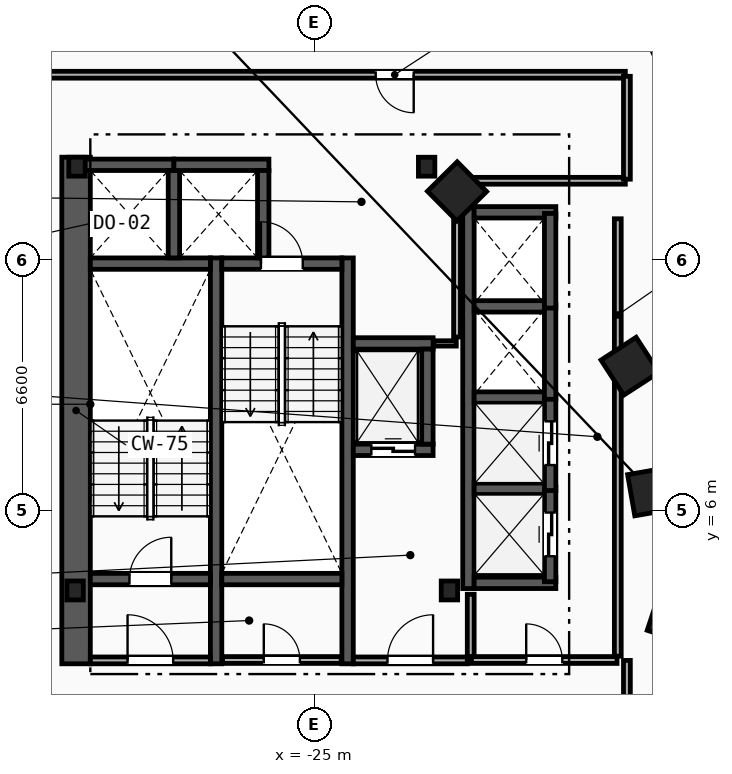
"""IFC4 building model, lengths in metres.
Left out: names, types, materials, properties, quantities, classifications, styles, units other than length and angle.
Written with IfcOpenShell. Run it as: python <this file> out.ifc"""

import sys

from ifc_helpers import new_model, si_unit, direction, frame, frame_2d, origin, origin_2d, place, context, subcontext, project, spatial, rectangle, i_section, extrude, element, fill, save


model = new_model("IFC4")
c1 = context("Model", 3, precision=1e-05, world=origin(), true_north=direction((0.0, 1.0)))
c2 = subcontext(c1, "Body", "Model", "MODEL_VIEW")
j1 = project(units=[si_unit("LENGTHUNIT", "METRE"), si_unit("PLANEANGLEUNIT", "RADIAN")], contexts=[c1])
p1 = place(None, origin())
s1 = spatial("IfcSite", under=j1, at=p1, CompositionType="ELEMENT")
p2 = place(p1, origin())
s2 = spatial("IfcBuilding", under=s1, at=p2, CompositionType="ELEMENT")
p3 = place(p2, frame((0.0, 0.0, 81.8)))
s3 = spatial("IfcBuildingStorey", under=s2, at=p3, CompositionType="ELEMENT", Elevation=81.8)
for number, where, z_axis, x_axis in (
    (1, (-31.3, 3.9, 0.0), (0.0, 0.0, 1.0), (1.0, 0.0, 0.0)),
    (2, (-21.45, 3.9, 0.0), (0.0, 0.0, 1.0), (1.0, 0.0, 0.0)),
    (3, (-22.05, 15.05, 0.0), (0.0, 0.0, 1.0), (1.0, 0.0, 0.0)),
    (4, (-31.25, 15.05, 0.0), (0.0, 0.0, 1.0), (1.0, 0.0, 0.0)),
):
    element("IfcColumn", number, at=place(p3, frame(where, z_axis=z_axis, x_axis=x_axis)), inside=s3, PredefinedType="COLUMN", context=c2, shape_type="SweptSolid", body=[
        extrude(i_section(OverallWidth=0.432, OverallDepth=0.498, WebThickness=0.056, FlangeThickness=0.089, FilletRadius=0.018, at=origin_2d()), origin(), (0.0, 0.0, 1.0), 3.6),
    ])
for number, where, z_axis, x_axis in (
    (5, (-15.55, 3.2, 0.0), (0.0, 0.0, 1.0), (0.315, 0.949, 0.0)),
    (6, (-16.125, 6.5, 0.0), (0.0, 0.0, 1.0), (-0.172, 0.985, 0.0)),
    (7, (-16.7, 9.8, 0.0), (0.0, 0.0, 1.0), (-0.544, 0.839, 0.0)),
    (8, (-21.25, 14.4, 0.0), (0.0, 0.0, 1.0), (-0.703, 0.711, 0.0)),
):
    element("IfcColumn", number, at=place(p3, frame(where, z_axis=z_axis, x_axis=x_axis)), inside=s3, PredefinedType="COLUMN", context=c2, shape_type="SweptSolid", body=[
        extrude(rectangle(XDim=1.1, YDim=1.1, at=origin_2d()), origin(), (0.0, 0.0, 1.0), 3.6),
    ])
p4 = place(p3, frame((-31.275, 1.97, 0.0), z_axis=(0.0, 0.0, 1.0), x_axis=(0.0, 1.0, 0.0)))
e9 = element("IfcWall", 9, at=p4, inside=s3, PredefinedType="SHEAR", context=c2, shape_type="SweptSolid", body=[
    extrude(rectangle(XDim=13.33, YDim=0.75, at=frame_2d((6.665, 0.0))), origin(), (0.0, 0.0, 1.0), 3.3),
])
for number, where, z_axis, x_axis in (
    (10, (-27.59, 1.97, 0.0), (0.0, 0.0, 1.0), (0.0, 1.0, 0.0)),
    (11, (-24.13, 1.97, 0.0), (0.0, 0.0, 1.0), (0.0, 1.0, 0.0)),
):
    element("IfcWall", number, at=place(p3, frame(where, z_axis=z_axis, x_axis=x_axis)), inside=s3, PredefinedType="SHEAR", context=c2, shape_type="SweptSolid", body=[
        extrude(rectangle(XDim=10.68, YDim=0.3, at=frame_2d((5.34, 0.0))), origin(), (0.0, 0.0, 1.0), 3.3),
    ])
p5 = place(p3, frame((-30.9, 4.2, 0.0), z_axis=(0.0, 0.0, 1.0), x_axis=(1.0, 0.0, 0.0)))
e12 = element("IfcWall", 12, at=p5, inside=s3, PredefinedType="SHEAR", context=c2, shape_type="SweptSolid", body=[
    extrude(rectangle(XDim=3.16, YDim=0.3, at=frame_2d((1.58, 0.0))), origin(), (0.0, 0.0, 1.0), 3.3),
])
p6 = place(p5, frame((1.03, 0.0, 0.0)))
e13 = element("IfcOpeningElement", 13, at=p6, cuts=e12, PredefinedType="OPENING", context=c2, shape_type="SweptSolid", body=[
    extrude(rectangle(XDim=1.1, YDim=2.15, at=frame_2d((0.55, 1.075))), frame((0.0, 0.16, 0.0), z_axis=(0.0, -1.0, 0.0), x_axis=(1.0, 0.0, 0.0)), (0.0, 0.0, 1.0), 0.32),
])
p7 = place(p3, frame((-30.9, 12.5, 0.0), z_axis=(0.0, 0.0, 1.0), x_axis=(1.0, 0.0, 0.0)))
e14 = element("IfcWall", 14, at=p7, inside=s3, PredefinedType="SHEAR", context=c2, shape_type="SweptSolid", body=[
    extrude(rectangle(XDim=3.16, YDim=0.3, at=frame_2d((1.58, 0.0))), origin(), (0.0, 0.0, 1.0), 3.3),
])
p8 = place(p3, frame((-27.44, 12.5, 0.0), z_axis=(0.0, 0.0, 1.0), x_axis=(1.0, 0.0, 0.0)))
e15 = element("IfcWall", 15, at=p8, inside=s3, PredefinedType="SHEAR", context=c2, shape_type="SweptSolid", body=[
    extrude(rectangle(XDim=3.16, YDim=0.3, at=frame_2d((1.58, 0.0))), origin(), (0.0, 0.0, 1.0), 3.3),
])
p9 = place(p8, frame((1.03, 0.0, 0.0)))
e16 = element("IfcOpeningElement", 16, at=p9, cuts=e15, PredefinedType="OPENING", context=c2, shape_type="SweptSolid", body=[
    extrude(rectangle(XDim=1.1, YDim=2.15, at=frame_2d((0.55, 1.075))), frame((0.0, 0.16, 0.0), z_axis=(0.0, -1.0, 0.0), x_axis=(1.0, 0.0, 0.0)), (0.0, 0.0, 1.0), 0.32),
])
p10 = place(p3, frame((-27.44, 4.2, 0.0), z_axis=(0.0, 0.0, 1.0), x_axis=(1.0, 0.0, 0.0)))
e17 = element("IfcWall", 17, at=p10, inside=s3, PredefinedType="SHEAR", context=c2, shape_type="SweptSolid", body=[
    extrude(rectangle(XDim=3.16, YDim=0.3, at=frame_2d((1.58, 0.0))), origin(), (0.0, 0.0, 1.0), 3.3),
])
p11 = place(p3, frame((-20.89, 2.15, 0.0), z_axis=(0.0, 0.0, 1.0), x_axis=(0.0, 1.0, 0.0)))
e18 = element("IfcWall", 18, at=p11, inside=s3, PredefinedType="PARTITIONING", context=c2, shape_type="SweptSolid", body=[
    extrude(rectangle(XDim=1.65, YDim=0.18, at=frame_2d((0.825, 0.0))), origin(), (0.0, 0.0, 1.0), 3.3),
])
p12 = place(p3, frame((-23.98, 2.06, 0.0), z_axis=(0.0, 0.0, 1.0), x_axis=(1.0, 0.0, 0.0)))
e19 = element("IfcWall", 19, at=p12, inside=s3, PredefinedType="PARTITIONING", context=c2, shape_type="SweptSolid", body=[
    extrude(rectangle(XDim=3.0, YDim=0.18, at=frame_2d((1.5, 0.0))), origin(), (0.0, 0.0, 1.0), 3.3),
])
p13 = place(p12, frame((0.9, 0.0, 0.0)))
e20 = element("IfcOpeningElement", 20, at=p13, cuts=e19, PredefinedType="OPENING", context=c2, shape_type="SweptSolid", body=[
    extrude(rectangle(XDim=1.2, YDim=2.15, at=frame_2d((0.6, 1.075))), frame((0.0, 0.1, 0.0), z_axis=(0.0, -1.0, 0.0), x_axis=(1.0, 0.0, 0.0)), (0.0, 0.0, 1.0), 0.2),
])
p14 = place(p3, frame((-30.9, 2.06, 0.0), z_axis=(0.0, 0.0, 1.0), x_axis=(1.0, 0.0, 0.0)))
e21 = element("IfcWall", 21, at=p14, inside=s3, PredefinedType="PARTITIONING", context=c2, shape_type="SweptSolid", body=[
    extrude(rectangle(XDim=3.16, YDim=0.18, at=frame_2d((1.58, 0.0))), origin(), (0.0, 0.0, 1.0), 3.3),
])
p15 = place(p14, frame((0.98, 0.0, 0.0)))
e22 = element("IfcOpeningElement", 22, at=p15, cuts=e21, PredefinedType="OPENING", context=c2, shape_type="SweptSolid", body=[
    extrude(rectangle(XDim=1.2, YDim=2.15, at=frame_2d((0.6, 1.075))), frame((0.0, 0.1, 0.0), z_axis=(0.0, -1.0, 0.0), x_axis=(1.0, 0.0, 0.0)), (0.0, 0.0, 1.0), 0.2),
])
p16 = place(p3, frame((-23.98, 7.6, 0.0), z_axis=(0.0, 0.0, 1.0), x_axis=(1.0, 0.0, 0.0)))
e23 = element("IfcWall", 23, at=p16, inside=s3, PredefinedType="SHEAR", context=c2, shape_type="SweptSolid", body=[
    extrude(rectangle(XDim=2.1, YDim=0.3, at=frame_2d((1.05, 0.0))), origin(), (0.0, 0.0, 1.0), 3.3),
])
p17 = place(p16, frame((0.475, 0.0, 0.0)))
e24 = element("IfcOpeningElement", 24, at=p17, cuts=e23, PredefinedType="OPENING", context=c2, shape_type="SweptSolid", body=[
    extrude(rectangle(XDim=1.15, YDim=2.2, at=frame_2d((0.575, 1.1))), frame((0.0, 0.16, 0.0), z_axis=(0.0, -1.0, 0.0), x_axis=(1.0, 0.0, 0.0)), (0.0, 0.0, 1.0), 0.32),
])
p18 = place(p3, frame((-23.98, 10.4, 0.0), z_axis=(0.0, 0.0, 1.0), x_axis=(1.0, 0.0, 0.0)))
e25 = element("IfcWall", 25, at=p18, inside=s3, PredefinedType="SHEAR", context=c2, shape_type="SweptSolid", body=[
    extrude(rectangle(XDim=2.1, YDim=0.3, at=frame_2d((1.05, 0.0))), origin(), (0.0, 0.0, 1.0), 3.3),
])
for number, where, z_axis, x_axis in (
    (26, (-22.03, 7.75, 0.0), (0.0, 0.0, 1.0), (0.0, 1.0, 0.0)),
    (27, (-31.2, 15.1, 0.0), (0.0, 0.0, 1.0), (1.0, 0.0, 0.0)),
):
    element("IfcWall", number, at=place(p3, frame(where, z_axis=z_axis, x_axis=x_axis)), inside=s3, PredefinedType="SHEAR", context=c2, shape_type="SweptSolid", body=[
        extrude(rectangle(XDim=2.5, YDim=0.3, at=frame_2d((1.25, 0.0))), origin(), (0.0, 0.0, 1.0), 3.3),
    ])
p19 = place(p3, frame((-28.7, 12.65, 0.0), z_axis=(0.0, 0.0, 1.0), x_axis=(0.0, 1.0, 0.0)))
e28 = element("IfcWall", 28, at=p19, inside=s3, PredefinedType="SHEAR", context=c2, shape_type="SweptSolid", body=[
    extrude(rectangle(XDim=2.3, YDim=0.3, at=frame_2d((1.15, 0.0))), origin(), (0.0, 0.0, 1.0), 3.3),
])
p20 = place(p3, frame((-28.7, 15.1, 0.0), z_axis=(0.0, 0.0, 1.0), x_axis=(1.0, 0.0, 0.0)))
e29 = element("IfcWall", 29, at=p20, inside=s3, PredefinedType="SHEAR", context=c2, shape_type="SweptSolid", body=[
    extrude(rectangle(XDim=2.5, YDim=0.3, at=frame_2d((1.25, 0.0))), origin(), (0.0, 0.0, 1.0), 3.3),
])
p21 = place(p3, frame((-26.35, 12.65, 0.0), z_axis=(0.0, 0.0, 1.0), x_axis=(0.0, 1.0, 0.0)))
e30 = element("IfcWall", 30, at=p21, inside=s3, PredefinedType="SHEAR", context=c2, shape_type="SweptSolid", body=[
    extrude(rectangle(XDim=2.3, YDim=0.3, at=frame_2d((1.15, 0.0))), origin(), (0.0, 0.0, 1.0), 3.3),
])
p22 = place(p3, frame((-20.95, 3.95, 0.0), z_axis=(0.0, 0.0, 1.0), x_axis=(0.0, 1.0, 0.0)))
e31 = element("IfcWall", 31, at=p22, inside=s3, PredefinedType="SHEAR", context=c2, shape_type="SweptSolid", body=[
    extrude(rectangle(XDim=10.05, YDim=0.3, at=frame_2d((5.025, 0.0))), origin(), (0.0, 0.0, 1.0), 3.3),
])
for number, where, z_axis, x_axis in (
    (32, (-20.8, 4.1, 0.0), (0.0, 0.0, 1.0), (1.0, 0.0, 0.0)),
    (33, (-20.8, 13.85, 0.0), (0.0, 0.0, 1.0), (1.0, 0.0, 0.0)),
):
    element("IfcWall", number, at=place(p3, frame(where, z_axis=z_axis, x_axis=x_axis)), inside=s3, PredefinedType="SHEAR", context=c2, shape_type="SweptSolid", body=[
        extrude(rectangle(XDim=2.15, YDim=0.3, at=frame_2d((1.075, 0.0))), origin(), (0.0, 0.0, 1.0), 3.3),
    ])
for number, where, z_axis, x_axis in (
    (34, (-20.8, 6.575, 0.0), (0.0, 0.0, 1.0), (1.0, 0.0, 0.0)),
    (35, (-20.8, 8.975, 0.0), (0.0, 0.0, 1.0), (1.0, 0.0, 0.0)),
    (36, (-20.8, 11.375, 0.0), (0.0, 0.0, 1.0), (1.0, 0.0, 0.0)),
):
    element("IfcWall", number, at=place(p3, frame(where, z_axis=z_axis, x_axis=x_axis)), inside=s3, PredefinedType="SHEAR", context=c2, shape_type="SweptSolid", body=[
        extrude(rectangle(XDim=1.85, YDim=0.3, at=frame_2d((0.925, 0.0))), origin(), (0.0, 0.0, 1.0), 3.3),
    ])
p23 = place(p3, frame((-18.8, 4.13, 0.0), z_axis=(0.0, 0.0, 1.0), x_axis=(0.0, 1.0, 0.0)))
e37 = element("IfcWall", 37, at=p23, inside=s3, PredefinedType="SHEAR", context=c2, shape_type="SweptSolid", body=[
    extrude(rectangle(XDim=2.49, YDim=0.3, at=frame_2d((1.245, 0.0))), origin(), (0.0, 0.0, 1.0), 3.3),
])
p24 = place(p23, frame((0.67, 0.0, 0.0)))
e38 = element("IfcOpeningElement", 38, at=p24, cuts=e37, PredefinedType="OPENING", context=c2, shape_type="SweptSolid", body=[
    extrude(rectangle(XDim=1.15, YDim=2.2, at=frame_2d((0.575, 1.1))), frame((0.0, 0.16, 0.0), z_axis=(0.0, -1.0, 0.0), x_axis=(1.0, 0.0, 0.0)), (0.0, 0.0, 1.0), 0.32),
])
p25 = place(p3, frame((-18.8, 6.53, 0.0), z_axis=(0.0, 0.0, 1.0), x_axis=(0.0, 1.0, 0.0)))
e39 = element("IfcWall", 39, at=p25, inside=s3, PredefinedType="SHEAR", context=c2, shape_type="SweptSolid", body=[
    extrude(rectangle(XDim=2.49, YDim=0.3, at=frame_2d((1.245, 0.0))), origin(), (0.0, 0.0, 1.0), 3.3),
])
p26 = place(p25, frame((0.67, 0.0, 0.0)))
e40 = element("IfcOpeningElement", 40, at=p26, cuts=e39, PredefinedType="OPENING", context=c2, shape_type="SweptSolid", body=[
    extrude(rectangle(XDim=1.15, YDim=2.2, at=frame_2d((0.575, 1.1))), frame((0.0, 0.16, 0.0), z_axis=(0.0, -1.0, 0.0), x_axis=(1.0, 0.0, 0.0)), (0.0, 0.0, 1.0), 0.32),
])
for number, where, z_axis, x_axis in (
    (41, (-18.8, 8.93, 0.0), (0.0, 0.0, 1.0), (0.0, 1.0, 0.0)),
    (42, (-18.8, 11.33, 0.0), (0.0, 0.0, 1.0), (0.0, 1.0, 0.0)),
):
    element("IfcWall", number, at=place(p3, frame(where, z_axis=z_axis, x_axis=x_axis)), inside=s3, PredefinedType="SHEAR", context=c2, shape_type="SweptSolid", body=[
        extrude(rectangle(XDim=2.49, YDim=0.3, at=frame_2d((1.245, 0.0))), origin(), (0.0, 0.0, 1.0), 3.3),
    ])
p27 = place(p3, frame((-17.02, 2.17, 0.0), z_axis=(0.0, 0.0, 1.0), x_axis=(0.0, 1.0, 0.0)))
e43 = element("IfcWall", 43, at=p27, inside=s3, PredefinedType="PARTITIONING", context=c2, shape_type="SweptSolid", body=[
    extrude(rectangle(XDim=11.51, YDim=0.18, at=frame_2d((5.755, 0.0))), origin(), (0.0, 0.0, 1.0), 3.3),
])
p28 = place(p3, frame((-20.87, 2.07, 0.0), z_axis=(0.0, 0.0, 1.0), x_axis=(1.0, 0.0, 0.0)))
e44 = element("IfcWall", 44, at=p28, inside=s3, PredefinedType="PARTITIONING", context=c2, shape_type="SweptSolid", body=[
    extrude(rectangle(XDim=3.83, YDim=0.18, at=frame_2d((1.915, 0.0))), origin(), (0.0, 0.0, 1.0), 3.3),
])
p29 = place(p28, frame((1.44, 0.0, 0.0)))
e45 = element("IfcOpeningElement", 45, at=p29, cuts=e44, PredefinedType="OPENING", context=c2, shape_type="SweptSolid", body=[
    extrude(rectangle(XDim=0.95, YDim=2.1, at=frame_2d((0.475, 1.05))), frame((0.0, 0.1, 0.0), z_axis=(0.0, -1.0, 0.0), x_axis=(1.0, 0.0, 0.0)), (0.0, 0.0, 1.0), 0.2),
])
p30 = place(p3, frame((-21.86, 10.4, 0.0), z_axis=(0.0, 0.0, 1.0), x_axis=(1.0, 0.0, 0.0)))
e46 = element("IfcWall", 46, at=p30, inside=s3, PredefinedType="PARTITIONING", context=c2, shape_type="SweptSolid", body=[
    extrude(rectangle(XDim=0.59, YDim=0.14, at=frame_2d((0.295, 0.0))), origin(), (0.0, 0.0, 1.0), 3.3),
])
p31 = place(p3, frame((-21.25, 10.57, 0.0), z_axis=(0.0, 0.0, 1.0), x_axis=(0.0, 1.0, 0.0)))
e47 = element("IfcWall", 47, at=p31, inside=s3, PredefinedType="PARTITIONING", context=c2, shape_type="SweptSolid", body=[
    extrude(rectangle(XDim=4.36, YDim=0.18, at=frame_2d((2.18, 0.0))), origin(), (0.0, 0.0, 1.0), 3.3),
])
p32 = place(p3, frame((-27.42, 2.07, 0.0), z_axis=(0.0, 0.0, 1.0), x_axis=(1.0, 0.0, 0.0)))
e48 = element("IfcWall", 48, at=p32, inside=s3, PredefinedType="PARTITIONING", context=c2, shape_type="SweptSolid", body=[
    extrude(rectangle(XDim=3.12, YDim=0.18, at=frame_2d((1.56, 0.0))), origin(), (0.0, 0.0, 1.0), 3.3),
])
p33 = place(p32, frame((1.085, 0.0, 0.0)))
e49 = element("IfcOpeningElement", 49, at=p33, cuts=e48, PredefinedType="OPENING", context=c2, shape_type="SweptSolid", body=[
    extrude(rectangle(XDim=0.95, YDim=2.1, at=frame_2d((0.475, 1.05))), frame((0.0, 0.1, 0.0), z_axis=(0.0, -1.0, 0.0), x_axis=(1.0, 0.0, 0.0)), (0.0, 0.0, 1.0), 0.2),
])
p34 = place(p3, frame((-16.822, 17.47, 0.0), z_axis=(0.0, 0.0, 1.0), x_axis=(-1.0, 0.0, 0.0)))
e50 = element("IfcWall", 50, at=p34, inside=s3, PredefinedType="PARTITIONING", context=c2, shape_type="SweptSolid", body=[
    extrude(rectangle(XDim=16.807, YDim=0.18, at=frame_2d((8.403, 0.0))), origin(), (0.0, 0.0, 1.0), 3.3),
])
p35 = place(p34, frame((5.569, 0.0, 0.0)))
e51 = element("IfcOpeningElement", 51, at=p35, cuts=e50, PredefinedType="OPENING", context=c2, shape_type="SweptSolid", body=[
    extrude(rectangle(XDim=1.0, YDim=2.15, at=frame_2d((0.5, 1.075))), frame((0.0, 0.1, 0.0), z_axis=(0.0, -1.0, 0.0), x_axis=(1.0, 0.0, 0.0)), (0.0, 0.0, 1.0), 0.2),
])
p36 = place(p3, frame((-21.178, 14.68, 0.0), z_axis=(0.0, 0.0, 1.0), x_axis=(1.0, 0.0, 0.0)))
e52 = element("IfcWall", 52, at=p36, inside=s3, PredefinedType="PARTITIONING", context=c2, shape_type="SweptSolid", body=[
    extrude(rectangle(XDim=4.357, YDim=0.18, at=frame_2d((2.178, 0.0))), origin(), (0.0, 0.0, 1.0), 3.3),
])
p37 = place(p3, frame((-16.78, 14.721, 0.0), z_axis=(0.0, 0.0, 1.0), x_axis=(0.0, 1.0, 0.0)))
e53 = element("IfcWall", 53, at=p37, inside=s3, PredefinedType="PARTITIONING", context=c2, shape_type="SweptSolid", body=[
    extrude(rectangle(XDim=2.707, YDim=0.18, at=frame_2d((1.354, 0.0))), origin(), (0.0, 0.0, 1.0), 3.3),
])
p38 = place(p3, frame((-16.78, -0.329, 0.0), z_axis=(0.0, 0.0, 1.0), x_axis=(0.0, 1.0, 0.0)))
e54 = element("IfcWall", 54, at=p38, inside=s3, PredefinedType="PARTITIONING", context=c2, shape_type="SweptSolid", body=[
    extrude(rectangle(XDim=2.387, YDim=0.18, at=frame_2d((1.194, 0.0))), origin(), (0.0, 0.0, 1.0), 3.3),
])
p39 = place(p6, origin())
e55 = element("IfcDoor", 55, at=p39, inside=s3, OperationType="SINGLE_SWING_RIGHT", PredefinedType="DOOR", context=c2, shape_type="SweptSolid", body=[
    extrude(rectangle(XDim=1.1, YDim=2.15, at=frame_2d((0.55, 1.075))), frame((0.0, 0.025, 0.0), z_axis=(0.0, -1.0, 0.0), x_axis=(1.0, 0.0, 0.0)), (0.0, 0.0, 1.0), 0.05),
])
fill(e13, e55)
p40 = place(p9, origin())
e56 = element("IfcDoor", 56, at=p40, inside=s3, OperationType="SINGLE_SWING_LEFT", PredefinedType="DOOR", context=c2, shape_type="SweptSolid", body=[
    extrude(rectangle(XDim=1.1, YDim=2.15, at=frame_2d((0.55, 1.075))), frame((0.0, 0.025, 0.0), z_axis=(0.0, -1.0, 0.0), x_axis=(1.0, 0.0, 0.0)), (0.0, 0.0, 1.0), 0.05),
])
fill(e16, e56)
p41 = place(p13, origin())
e57 = element("IfcDoor", 57, at=p41, inside=s3, OperationType="SINGLE_SWING_RIGHT", PredefinedType="DOOR", context=c2, shape_type="SweptSolid", body=[
    extrude(rectangle(XDim=1.2, YDim=2.15, at=frame_2d((0.6, 1.075))), frame((0.0, 0.025, 0.0), z_axis=(0.0, -1.0, 0.0), x_axis=(1.0, 0.0, 0.0)), (0.0, 0.0, 1.0), 0.05),
])
fill(e20, e57)
p42 = place(p15, origin())
e58 = element("IfcDoor", 58, at=p42, inside=s3, OperationType="SINGLE_SWING_LEFT", PredefinedType="DOOR", context=c2, shape_type="SweptSolid", body=[
    extrude(rectangle(XDim=1.2, YDim=2.15, at=frame_2d((0.6, 1.075))), frame((0.0, 0.025, 0.0), z_axis=(0.0, -1.0, 0.0), x_axis=(1.0, 0.0, 0.0)), (0.0, 0.0, 1.0), 0.05),
])
fill(e22, e58)
p43 = place(p17, origin())
e59 = element("IfcDoor", 59, at=p43, inside=s3, OperationType="SLIDING_TO_LEFT", PredefinedType="TRAPDOOR", context=c2, shape_type="SweptSolid", body=[
    extrude(rectangle(XDim=1.15, YDim=2.2, at=frame_2d((0.575, 1.1))), frame((0.0, 0.025, 0.0), z_axis=(0.0, -1.0, 0.0), x_axis=(1.0, 0.0, 0.0)), (0.0, 0.0, 1.0), 0.05),
])
fill(e24, e59)
p44 = place(p24, origin())
e60 = element("IfcDoor", 60, at=p44, inside=s3, OperationType="SLIDING_TO_LEFT", PredefinedType="TRAPDOOR", context=c2, shape_type="SweptSolid", body=[
    extrude(rectangle(XDim=1.15, YDim=2.2, at=frame_2d((0.575, 1.1))), frame((0.0, 0.025, 0.0), z_axis=(0.0, -1.0, 0.0), x_axis=(1.0, 0.0, 0.0)), (0.0, 0.0, 1.0), 0.05),
])
fill(e38, e60)
p45 = place(p26, origin())
e61 = element("IfcDoor", 61, at=p45, inside=s3, OperationType="SLIDING_TO_LEFT", PredefinedType="TRAPDOOR", context=c2, shape_type="SweptSolid", body=[
    extrude(rectangle(XDim=1.15, YDim=2.2, at=frame_2d((0.575, 1.1))), frame((0.0, 0.025, 0.0), z_axis=(0.0, -1.0, 0.0), x_axis=(1.0, 0.0, 0.0)), (0.0, 0.0, 1.0), 0.05),
])
fill(e40, e61)
p46 = place(p35, origin())
e62 = element("IfcDoor", 62, at=p46, inside=s3, OperationType="SINGLE_SWING_LEFT", PredefinedType="DOOR", context=c2, shape_type="SweptSolid", body=[
    extrude(rectangle(XDim=1.0, YDim=2.15, at=frame_2d((0.5, 1.075))), frame((0.0, 0.025, 0.0), z_axis=(0.0, -1.0, 0.0), x_axis=(1.0, 0.0, 0.0)), (0.0, 0.0, 1.0), 0.05),
])
fill(e51, e62)
p47 = place(p29, origin())
e63 = element("IfcDoor", 63, at=p47, inside=s3, OperationType="SINGLE_SWING_LEFT", PredefinedType="DOOR", context=c2, shape_type="SweptSolid", body=[
    extrude(rectangle(XDim=0.95, YDim=2.1, at=frame_2d((0.475, 1.05))), frame((0.0, 0.025, 0.0), z_axis=(0.0, -1.0, 0.0), x_axis=(1.0, 0.0, 0.0)), (0.0, 0.0, 1.0), 0.05),
])
fill(e45, e63)
p48 = place(p33, origin())
e64 = element("IfcDoor", 64, at=p48, inside=s3, OperationType="SINGLE_SWING_LEFT", PredefinedType="DOOR", context=c2, shape_type="SweptSolid", body=[
    extrude(rectangle(XDim=0.95, YDim=2.1, at=frame_2d((0.475, 1.05))), frame((0.0, 0.025, 0.0), z_axis=(0.0, -1.0, 0.0), x_axis=(1.0, 0.0, 0.0)), (0.0, 0.0, 1.0), 0.05),
])
fill(e49, e64)
save(model, sys.argv[1])
